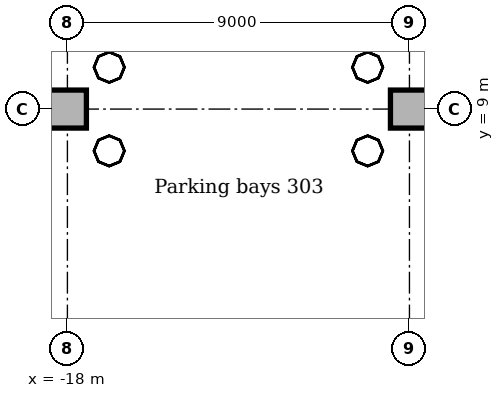
"""IFC4 building model, lengths in metres.
Left out: names, types, materials, properties, quantities, classifications, styles, units other than length and angle.
Written with IfcOpenShell. Run it as: python <this file> out.ifc"""

import sys

from ifc_helpers import new_model, si_unit, direction, frame, origin, origin_2d, place, context, subcontext, project, spatial, rectangle, extrude, element, save


model = new_model("IFC4")
c1 = context("Model", 3, precision=1e-05, world=origin(), true_north=direction((0.0, 1.0)))
c2 = subcontext(c1, "Body", "Model", "MODEL_VIEW")
j1 = project(units=[si_unit("LENGTHUNIT", "METRE"), si_unit("PLANEANGLEUNIT", "RADIAN")], contexts=[c1])
p1 = place(None, origin())
s1 = spatial("IfcSite", under=j1, at=p1, CompositionType="ELEMENT")
p2 = place(p1, origin())
s2 = spatial("IfcBuilding", under=s1, at=p2, CompositionType="ELEMENT")
p3 = place(p2, frame((0.0, 0.0, -14.0)))
s3 = spatial("IfcBuildingStorey", under=s2, at=p3, CompositionType="ELEMENT", Elevation=-14.0)
for number, where, z_axis, x_axis in (
    (1, (-18.0, 9.0, 0.0), (0.0, 0.0, 1.0), (1.0, 0.0, 0.0)),
    (2, (-9.0, 9.0, 0.0), (0.0, 0.0, 1.0), (1.0, 0.0, 0.0)),
):
    element("IfcColumn", number, at=place(p3, frame(where, z_axis=z_axis, x_axis=x_axis)), inside=s3, PredefinedType="COLUMN", context=c2, shape_type="SweptSolid", body=[
        extrude(rectangle(XDim=1.0, YDim=1.0, at=origin_2d()), origin(), (0.0, 0.0, 1.0), 4.15),
    ])
save(model, sys.argv[1])
